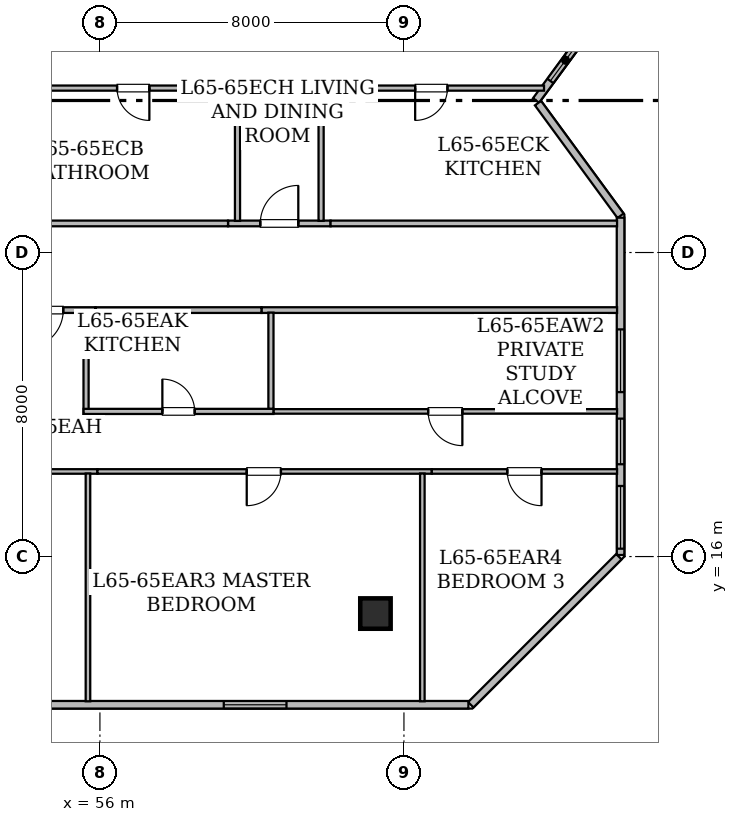
"""IFC4 building model, lengths in metres.
Left out: names, types, materials, properties, quantities, classifications, styles, units other than length and angle.
Written with IfcOpenShell. Run it as: python <this file> out.ifc"""

import sys

from ifc_helpers import new_model, si_unit, direction, frame, frame_2d, origin, origin_2d, place, context, subcontext, project, spatial, rectangle, hollow_rectangle, extrude, element, fill, save


model = new_model("IFC4")
c1 = context("Model", 3, precision=1e-05, world=origin(), true_north=direction((0.0, 1.0)))
c2 = subcontext(c1, "Body", "Model", "MODEL_VIEW")
j1 = project(units=[si_unit("LENGTHUNIT", "METRE"), si_unit("PLANEANGLEUNIT", "RADIAN")], contexts=[c1])
p1 = place(None, origin())
s1 = spatial("IfcSite", under=j1, at=p1, CompositionType="ELEMENT")
p2 = place(p1, origin())
s2 = spatial("IfcBuilding", under=s1, at=p2, CompositionType="ELEMENT")
p3 = place(p2, frame((0.0, 0.0, 253.7)))
s3 = spatial("IfcBuildingStorey", under=s2, at=p3, CompositionType="ELEMENT", Elevation=253.7)
for number, where, z_axis, x_axis in (
    (1, (63.25, 14.5, 0.0), (0.0, 0.0, 1.0), (1.0, 0.0, 0.0)),
    (2, (67.2, 21.425, 0.0), (0.0, 0.0, 1.0), (1.0, 0.0, 0.0)),
):
    element("IfcColumn", number, at=place(p3, frame(where, z_axis=z_axis, x_axis=x_axis)), inside=s3, PredefinedType="COLUMN", context=c2, shape_type="SweptSolid", body=[
        extrude(hollow_rectangle(XDim=0.8, YDim=0.8, WallThickness=0.04, at=origin_2d()), origin(), (0.0, 0.0, 1.0), 3.65),
    ])
p4 = place(p3, frame((69.67, 30.992, 0.0), z_axis=(0.0, 0.0, 1.0), x_axis=(-0.591320870733, -0.806436375566, 0.0)))
e3 = element("IfcWall", 3, at=p4, inside=s3, PredefinedType="STANDARD", context=c2, shape_type="SweptSolid", body=[
    extrude(rectangle(XDim=3.71, YDim=0.2, at=frame_2d((1.855, 0.0))), origin(), (0.0, 0.0, 1.0), 3.43),
])
p5 = place(p4, frame((1.723, 0.0, 0.85)))
e4 = element("IfcOpeningElement", 4, at=p5, cuts=e3, PredefinedType="OPENING", context=c2, shape_type="SweptSolid", body=[
    extrude(rectangle(XDim=1.35, YDim=1.5, at=frame_2d((0.675, 0.75))), frame((0.0, 0.11, 0.0), z_axis=(0.0, -1.0, 0.0), x_axis=(1.0, 0.0, 0.0)), (0.0, 0.0, 1.0), 0.22),
])
p6 = place(p3, frame((67.527, 27.931, 0.0), z_axis=(0.0, 0.0, 1.0), x_axis=(0.591248456881, -0.80648946815, 0.0)))
e5 = element("IfcWall", 5, at=p6, inside=s3, PredefinedType="STANDARD", context=c2, shape_type="SweptSolid", body=[
    extrude(rectangle(XDim=3.675, YDim=0.2, at=frame_2d((1.837, 0.0))), origin(), (0.0, 0.0, 1.0), 3.43),
])
p7 = place(p3, frame((69.7, 24.916, 0.0), z_axis=(0.0, 0.0, 1.0), x_axis=(0.0, -1.0, 0.0)))
e6 = element("IfcWall", 6, at=p7, inside=s3, PredefinedType="STANDARD", context=c2, shape_type="SweptSolid", body=[
    extrude(rectangle(XDim=8.875, YDim=0.2, at=frame_2d((4.438, 0.0))), origin(), (0.0, 0.0, 1.0), 3.43),
])
p8 = place(p7, frame((2.939, 0.0, 0.85)))
e7 = element("IfcOpeningElement", 7, at=p8, cuts=e6, PredefinedType="OPENING", context=c2, shape_type="SweptSolid", body=[
    extrude(rectangle(XDim=1.65, YDim=1.55, at=frame_2d((0.825, 0.775))), frame((0.0, 0.11, 0.0), z_axis=(0.0, -1.0, 0.0), x_axis=(1.0, 0.0, 0.0)), (0.0, 0.0, 1.0), 0.22),
])
p9 = place(p7, frame((5.287, 0.0, 0.8)))
e8 = element("IfcOpeningElement", 8, at=p9, cuts=e6, PredefinedType="OPENING", context=c2, shape_type="SweptSolid", body=[
    extrude(rectangle(XDim=1.2, YDim=1.5, at=frame_2d((0.6, 0.75))), frame((0.0, 0.11, 0.0), z_axis=(0.0, -1.0, 0.0), x_axis=(1.0, 0.0, 0.0)), (0.0, 0.0, 1.0), 0.22),
])
p10 = place(p7, frame((7.059, 0.0, 0.85)))
e9 = element("IfcOpeningElement", 9, at=p10, cuts=e6, PredefinedType="OPENING", context=c2, shape_type="SweptSolid", body=[
    extrude(rectangle(XDim=1.65, YDim=1.55, at=frame_2d((0.825, 0.775))), frame((0.0, 0.11, 0.0), z_axis=(0.0, -1.0, 0.0), x_axis=(1.0, 0.0, 0.0)), (0.0, 0.0, 1.0), 0.22),
])
p11 = place(p3, frame((69.655, 15.996, 0.0), z_axis=(0.0, 0.0, 1.0), x_axis=(-0.707106781187, -0.707106781187, 0.0)))
e10 = element("IfcWall", 10, at=p11, inside=s3, PredefinedType="STANDARD", context=c2, shape_type="SweptSolid", body=[
    extrude(rectangle(XDim=5.51, YDim=0.2, at=frame_2d((2.755, 0.0))), origin(), (0.0, 0.0, 1.0), 3.43),
])
p12 = place(p3, frame((65.696, 12.1, 0.0), z_axis=(0.0, 0.0, 1.0), x_axis=(-1.0, 0.0, 0.0)))
e11 = element("IfcWall", 11, at=p12, inside=s3, PredefinedType="STANDARD", context=c2, shape_type="SweptSolid", body=[
    extrude(rectangle(XDim=41.393, YDim=0.2, at=frame_2d((20.697, 0.0))), origin(), (0.0, 0.0, 1.0), 3.43),
])
p13 = place(p12, frame((30.646, 0.0, 0.85)))
e12 = element("IfcOpeningElement", 12, at=p13, cuts=e11, PredefinedType="OPENING", context=c2, shape_type="SweptSolid", body=[
    extrude(rectangle(XDim=1.65, YDim=1.55, at=frame_2d((0.825, 0.775))), frame((0.0, 0.11, 0.0), z_axis=(0.0, -1.0, 0.0), x_axis=(1.0, 0.0, 0.0)), (0.0, 0.0, 1.0), 0.22),
])
p14 = place(p12, frame((25.339, 0.0, 0.85)))
e13 = element("IfcOpeningElement", 13, at=p14, cuts=e11, PredefinedType="OPENING", context=c2, shape_type="SweptSolid", body=[
    extrude(rectangle(XDim=1.65, YDim=1.55, at=frame_2d((0.825, 0.775))), frame((0.0, 0.11, 0.0), z_axis=(0.0, -1.0, 0.0), x_axis=(1.0, 0.0, 0.0)), (0.0, 0.0, 1.0), 0.22),
])
p15 = place(p12, frame((20.022, 0.0, 0.85)))
e14 = element("IfcOpeningElement", 14, at=p15, cuts=e11, PredefinedType="OPENING", context=c2, shape_type="SweptSolid", body=[
    extrude(rectangle(XDim=1.65, YDim=1.55, at=frame_2d((0.825, 0.775))), frame((0.0, 0.11, 0.0), z_axis=(0.0, -1.0, 0.0), x_axis=(1.0, 0.0, 0.0)), (0.0, 0.0, 1.0), 0.22),
])
p16 = place(p12, frame((12.987, 0.0, 0.85)))
e15 = element("IfcOpeningElement", 15, at=p16, cuts=e11, PredefinedType="OPENING", context=c2, shape_type="SweptSolid", body=[
    extrude(rectangle(XDim=1.65, YDim=1.55, at=frame_2d((0.825, 0.775))), frame((0.0, 0.11, 0.0), z_axis=(0.0, -1.0, 0.0), x_axis=(1.0, 0.0, 0.0)), (0.0, 0.0, 1.0), 0.22),
])
p17 = place(p12, frame((4.787, 0.0, 0.85)))
e16 = element("IfcOpeningElement", 16, at=p17, cuts=e11, PredefinedType="OPENING", context=c2, shape_type="SweptSolid", body=[
    extrude(rectangle(XDim=1.65, YDim=1.55, at=frame_2d((0.825, 0.775))), frame((0.0, 0.11, 0.0), z_axis=(0.0, -1.0, 0.0), x_axis=(1.0, 0.0, 0.0)), (0.0, 0.0, 1.0), 0.22),
])
p18 = place(p3, frame((69.608, 22.485, 0.0), z_axis=(0.0, 0.0, 1.0), x_axis=(-1.0, 0.0, 0.0)))
e17 = element("IfcWall", 17, at=p18, inside=s3, PredefinedType="STANDARD", context=c2, shape_type="SweptSolid", body=[
    extrude(rectangle(XDim=9.357, YDim=0.15, at=frame_2d((4.678, 0.0))), origin(), (0.0, 0.0, 1.0), 2.887),
])
p19 = place(p3, frame((55.884, 22.485, 0.0), z_axis=(0.0, 0.0, 1.0), x_axis=(-1.0, 0.0, 0.0)))
e18 = element("IfcWall", 18, at=p19, inside=s3, PredefinedType="STANDARD", context=c2, shape_type="SweptSolid", body=[
    extrude(rectangle(XDim=2.698, YDim=0.15, at=frame_2d((1.349, 0.0))), origin(), (0.0, 0.0, 1.0), 2.725),
])
p20 = place(p19, frame((0.849, 0.0, 0.0)))
e19 = element("IfcOpeningElement", 19, at=p20, cuts=e18, PredefinedType="OPENING", context=c2, shape_type="SweptSolid", body=[
    extrude(rectangle(XDim=1.0, YDim=2.15, at=frame_2d((0.5, 1.075))), frame((0.0, 0.085, 0.0), z_axis=(0.0, -1.0, 0.0), x_axis=(1.0, 0.0, 0.0)), (0.0, 0.0, 1.0), 0.17),
])
p21 = place(p3, frame((60.251, 22.485, 0.0), z_axis=(0.0, 0.0, 1.0), x_axis=(-1.0, 0.0, 0.0)))
e20 = element("IfcWall", 20, at=p21, inside=s3, PredefinedType="STANDARD", context=c2, shape_type="SweptSolid", body=[
    extrude(rectangle(XDim=4.367, YDim=0.15, at=frame_2d((2.184, 0.0))), origin(), (0.0, 0.0, 1.0), 3.43),
])
p22 = place(p3, frame((59.371, 24.765, 0.0), z_axis=(0.0, 0.0, 1.0), x_axis=(1.0, 0.0, 0.0)))
e21 = element("IfcWall", 21, at=p22, inside=s3, PredefinedType="STANDARD", context=c2, shape_type="SweptSolid", body=[
    extrude(rectangle(XDim=2.698, YDim=0.15, at=frame_2d((1.349, 0.0))), origin(), (0.0, 0.0, 1.0), 3.43),
])
p23 = place(p22, frame((0.849, 0.0, 0.0)))
e22 = element("IfcOpeningElement", 22, at=p23, cuts=e21, PredefinedType="OPENING", context=c2, shape_type="SweptSolid", body=[
    extrude(rectangle(XDim=1.0, YDim=2.15, at=frame_2d((0.5, 1.075))), frame((0.0, 0.085, 0.0), z_axis=(0.0, -1.0, 0.0), x_axis=(1.0, 0.0, 0.0)), (0.0, 0.0, 1.0), 0.17),
])
p24 = place(p3, frame((54.234, 24.765, 0.0), z_axis=(0.0, 0.0, 1.0), x_axis=(1.0, 0.0, 0.0)))
e23 = element("IfcWall", 23, at=p24, inside=s3, PredefinedType="STANDARD", context=c2, shape_type="SweptSolid", body=[
    extrude(rectangle(XDim=5.137, YDim=0.15, at=frame_2d((2.569, 0.0))), origin(), (0.0, 0.0, 1.0), 3.43),
])
p25 = place(p3, frame((62.069, 24.765, 0.0), z_axis=(0.0, 0.0, 1.0), x_axis=(1.0, 0.0, 0.0)))
e24 = element("IfcWall", 24, at=p25, inside=s3, PredefinedType="STANDARD", context=c2, shape_type="SweptSolid", body=[
    extrude(rectangle(XDim=7.539, YDim=0.15, at=frame_2d((3.77, 0.0))), origin(), (0.0, 0.0, 1.0), 2.887),
])
p26 = place(p3, frame((69.608, 19.819, 0.0), z_axis=(0.0, 0.0, 1.0), x_axis=(-1.0, 0.0, 0.0)))
e25 = element("IfcWall", 25, at=p26, inside=s3, PredefinedType="PARTITIONING", context=c2, shape_type="SweptSolid", body=[
    extrude(rectangle(XDim=9.043, YDim=0.12, at=frame_2d((4.521, 0.0))), origin(), (0.0, 0.0, 1.0), 2.725),
])
p27 = place(p26, frame((4.071, 0.0, 0.0)))
e26 = element("IfcOpeningElement", 26, at=p27, cuts=e25, PredefinedType="OPENING", context=c2, shape_type="SweptSolid", body=[
    extrude(rectangle(XDim=0.9, YDim=2.1, at=frame_2d((0.45, 1.05))), frame((0.0, 0.07, 0.0), z_axis=(0.0, -1.0, 0.0), x_axis=(1.0, 0.0, 0.0)), (0.0, 0.0, 1.0), 0.14),
])
p28 = place(p3, frame((60.5, 19.884, 0.0), z_axis=(0.0, 0.0, 1.0), x_axis=(0.0, 1.0, 0.0)))
e27 = element("IfcWall", 27, at=p28, inside=s3, PredefinedType="PARTITIONING", context=c2, shape_type="SweptSolid", body=[
    extrude(rectangle(XDim=2.534, YDim=0.135, at=frame_2d((1.267, 0.0))), origin(), (0.0, 0.0, 1.0), 3.43),
])
p29 = place(p3, frame((55.635, 22.418, 0.0), z_axis=(0.0, 0.0, 1.0), x_axis=(0.0, -1.0, 0.0)))
e28 = element("IfcWall", 28, at=p29, inside=s3, PredefinedType="PARTITIONING", context=c2, shape_type="SweptSolid", body=[
    extrude(rectangle(XDim=2.664, YDim=0.135, at=frame_2d((1.332, 0.0))), origin(), (0.0, 0.0, 1.0), 3.43),
])
p30 = place(p3, frame((55.57, 19.819, 0.0), z_axis=(0.0, 0.0, 1.0), x_axis=(1.0, 0.0, 0.0)))
e29 = element("IfcWall", 29, at=p30, inside=s3, PredefinedType="PARTITIONING", context=c2, shape_type="SweptSolid", body=[
    extrude(rectangle(XDim=4.995, YDim=0.135, at=frame_2d((2.498, 0.0))), origin(), (0.0, 0.0, 1.0), 2.725),
])
p31 = place(p30, frame((2.073, 0.0, 0.0)))
e30 = element("IfcOpeningElement", 30, at=p31, cuts=e29, PredefinedType="OPENING", context=c2, shape_type="SweptSolid", body=[
    extrude(rectangle(XDim=0.85, YDim=2.1, at=frame_2d((0.425, 1.05))), frame((0.0, 0.077, 0.0), z_axis=(0.0, -1.0, 0.0), x_axis=(1.0, 0.0, 0.0)), (0.0, 0.0, 1.0), 0.155),
])
p32 = place(p3, frame((55.934, 18.239, 0.0), z_axis=(0.0, 0.0, 1.0), x_axis=(-1.0, 0.0, 0.0)))
e31 = element("IfcWall", 31, at=p32, inside=s3, PredefinedType="PARTITIONING", context=c2, shape_type="SweptSolid", body=[
    extrude(rectangle(XDim=7.601, YDim=0.12, at=frame_2d((3.801, 0.0))), origin(), (0.0, 0.0, 1.0), 2.725),
])
p33 = place(p32, frame((3.371, 0.0, 0.0)))
e32 = element("IfcOpeningElement", 32, at=p33, cuts=e31, PredefinedType="OPENING", context=c2, shape_type="SweptSolid", body=[
    extrude(rectangle(XDim=0.9, YDim=2.1, at=frame_2d((0.45, 1.05))), frame((0.0, 0.07, 0.0), z_axis=(0.0, -1.0, 0.0), x_axis=(1.0, 0.0, 0.0)), (0.0, 0.0, 1.0), 0.14),
])
p34 = place(p3, frame((64.733, 18.239, 0.0), z_axis=(0.0, 0.0, 1.0), x_axis=(-1.0, 0.0, 0.0)))
e33 = element("IfcWall", 33, at=p34, inside=s3, PredefinedType="PARTITIONING", context=c2, shape_type="SweptSolid", body=[
    extrude(rectangle(XDim=8.799, YDim=0.12, at=frame_2d((4.399, 0.0))), origin(), (0.0, 0.0, 1.0), 2.725),
])
p35 = place(p34, frame((3.97, 0.0, 0.0)))
e34 = element("IfcOpeningElement", 34, at=p35, cuts=e33, PredefinedType="OPENING", context=c2, shape_type="SweptSolid", body=[
    extrude(rectangle(XDim=0.9, YDim=2.1, at=frame_2d((0.45, 1.05))), frame((0.0, 0.07, 0.0), z_axis=(0.0, -1.0, 0.0), x_axis=(1.0, 0.0, 0.0)), (0.0, 0.0, 1.0), 0.14),
])
p36 = place(p3, frame((69.608, 18.239, 0.0), z_axis=(0.0, 0.0, 1.0), x_axis=(-1.0, 0.0, 0.0)))
e35 = element("IfcWall", 35, at=p36, inside=s3, PredefinedType="PARTITIONING", context=c2, shape_type="SweptSolid", body=[
    extrude(rectangle(XDim=4.875, YDim=0.12, at=frame_2d((2.438, 0.0))), origin(), (0.0, 0.0, 1.0), 2.887),
])
p37 = place(p36, frame((1.988, 0.0, 0.0)))
e36 = element("IfcOpeningElement", 36, at=p37, cuts=e35, PredefinedType="OPENING", context=c2, shape_type="SweptSolid", body=[
    extrude(rectangle(XDim=0.9, YDim=2.1, at=frame_2d((0.45, 1.05))), frame((0.0, 0.07, 0.0), z_axis=(0.0, -1.0, 0.0), x_axis=(1.0, 0.0, 0.0)), (0.0, 0.0, 1.0), 0.14),
])
p38 = place(p3, frame((55.685, 18.185, 0.0), z_axis=(0.0, 0.0, 1.0), x_axis=(0.0, -1.0, 0.0)))
e37 = element("IfcWall", 37, at=p38, inside=s3, PredefinedType="PARTITIONING", context=c2, shape_type="SweptSolid", body=[
    extrude(rectangle(XDim=5.993, YDim=0.12, at=frame_2d((2.997, 0.0))), origin(), (0.0, 0.0, 1.0), 2.725),
])
p39 = place(p3, frame((64.484, 18.185, 0.0), z_axis=(0.0, 0.0, 1.0), x_axis=(0.0, -1.0, 0.0)))
e38 = element("IfcWall", 38, at=p39, inside=s3, PredefinedType="PARTITIONING", context=c2, shape_type="SweptSolid", body=[
    extrude(rectangle(XDim=5.993, YDim=0.12, at=frame_2d((2.997, 0.0))), origin(), (0.0, 0.0, 1.0), 2.887),
])
p40 = place(p3, frame((59.62, 24.832, 0.0), z_axis=(0.0, 0.0, 1.0), x_axis=(0.0, 1.0, 0.0)))
e39 = element("IfcWall", 39, at=p40, inside=s3, PredefinedType="PARTITIONING", context=c2, shape_type="SweptSolid", body=[
    extrude(rectangle(XDim=3.559, YDim=0.135, at=frame_2d((1.78, 0.0))), origin(), (0.0, 0.0, 1.0), 3.43),
])
p41 = place(p3, frame((59.685, 28.326, 0.0), z_axis=(0.0, 0.0, 1.0), x_axis=(-1.0, 0.0, 0.0)))
e40 = element("IfcWall", 40, at=p41, inside=s3, PredefinedType="PARTITIONING", context=c2, shape_type="SweptSolid", body=[
    extrude(rectangle(XDim=5.618, YDim=0.135, at=frame_2d((2.809, 0.0))), origin(), (0.0, 0.0, 1.0), 3.43),
])
p42 = place(p41, frame((2.384, 0.0, 0.0)))
e41 = element("IfcOpeningElement", 41, at=p42, cuts=e40, PredefinedType="OPENING", context=c2, shape_type="SweptSolid", body=[
    extrude(rectangle(XDim=0.85, YDim=2.1, at=frame_2d((0.425, 1.05))), frame((0.0, 0.077, 0.0), z_axis=(0.0, -1.0, 0.0), x_axis=(1.0, 0.0, 0.0)), (0.0, 0.0, 1.0), 0.155),
])
p43 = place(p3, frame((67.686, 28.326, 0.0), z_axis=(0.0, 0.0, 1.0), x_axis=(-1.0, 0.0, 0.0)))
e42 = element("IfcWall", 42, at=p43, inside=s3, PredefinedType="PARTITIONING", context=c2, shape_type="SweptSolid", body=[
    extrude(rectangle(XDim=5.931, YDim=0.135, at=frame_2d((2.966, 0.0))), origin(), (0.0, 0.0, 1.0), 2.887),
])
p44 = place(p43, frame((2.541, 0.0, 0.0)))
e43 = element("IfcOpeningElement", 43, at=p44, cuts=e42, PredefinedType="OPENING", context=c2, shape_type="SweptSolid", body=[
    extrude(rectangle(XDim=0.85, YDim=2.1, at=frame_2d((0.425, 1.05))), frame((0.0, 0.077, 0.0), z_axis=(0.0, -1.0, 0.0), x_axis=(1.0, 0.0, 0.0)), (0.0, 0.0, 1.0), 0.155),
])
p45 = place(p3, frame((61.82, 28.391, 0.0), z_axis=(0.0, 0.0, 1.0), x_axis=(0.0, -1.0, 0.0)))
e44 = element("IfcWall", 44, at=p45, inside=s3, PredefinedType="PARTITIONING", context=c2, shape_type="SweptSolid", body=[
    extrude(rectangle(XDim=3.559, YDim=0.135, at=frame_2d((1.78, 0.0))), origin(), (0.0, 0.0, 1.0), 3.43),
])
p46 = place(p8, origin())
e45 = element("IfcWindow", 45, at=p46, inside=s3, PartitioningType="SINGLE_PANEL", PredefinedType="WINDOW", context=c2, shape_type="SweptSolid", body=[
    extrude(rectangle(XDim=1.65, YDim=1.55, at=frame_2d((0.825, 0.775))), frame((0.0, 0.03, 0.0), z_axis=(0.0, -1.0, 0.0), x_axis=(1.0, 0.0, 0.0)), (0.0, 0.0, 1.0), 0.06),
])
fill(e7, e45)
p47 = place(p9, origin())
e46 = element("IfcWindow", 46, at=p47, inside=s3, PartitioningType="SINGLE_PANEL", PredefinedType="WINDOW", context=c2, shape_type="SweptSolid", body=[
    extrude(rectangle(XDim=1.2, YDim=1.5, at=frame_2d((0.6, 0.75))), frame((0.0, 0.03, 0.0), z_axis=(0.0, -1.0, 0.0), x_axis=(1.0, 0.0, 0.0)), (0.0, 0.0, 1.0), 0.06),
])
fill(e8, e46)
p48 = place(p17, origin())
e47 = element("IfcWindow", 47, at=p48, inside=s3, PartitioningType="SINGLE_PANEL", PredefinedType="WINDOW", context=c2, shape_type="SweptSolid", body=[
    extrude(rectangle(XDim=1.65, YDim=1.55, at=frame_2d((0.825, 0.775))), frame((0.0, 0.03, 0.0), z_axis=(0.0, -1.0, 0.0), x_axis=(1.0, 0.0, 0.0)), (0.0, 0.0, 1.0), 0.06),
])
fill(e16, e47)
p49 = place(p10, origin())
e48 = element("IfcWindow", 48, at=p49, inside=s3, PartitioningType="SINGLE_PANEL", PredefinedType="WINDOW", context=c2, shape_type="SweptSolid", body=[
    extrude(rectangle(XDim=1.65, YDim=1.55, at=frame_2d((0.825, 0.775))), frame((0.0, 0.03, 0.0), z_axis=(0.0, -1.0, 0.0), x_axis=(1.0, 0.0, 0.0)), (0.0, 0.0, 1.0), 0.06),
])
fill(e9, e48)
p50 = place(p5, origin())
e49 = element("IfcWindow", 49, at=p50, inside=s3, PartitioningType="SINGLE_PANEL", PredefinedType="WINDOW", context=c2, shape_type="SweptSolid", body=[
    extrude(rectangle(XDim=1.35, YDim=1.5, at=frame_2d((0.675, 0.75))), frame((0.0, 0.03, 0.0), z_axis=(0.0, -1.0, 0.0), x_axis=(1.0, 0.0, 0.0)), (0.0, 0.0, 1.0), 0.06),
])
fill(e4, e49)
p51 = place(p20, origin())
e50 = element("IfcDoor", 50, at=p51, inside=s3, OperationType="SINGLE_SWING_RIGHT", PredefinedType="DOOR", context=c2, shape_type="SweptSolid", body=[
    extrude(rectangle(XDim=1.0, YDim=2.15, at=frame_2d((0.5, 1.075))), frame((0.0, 0.025, 0.0), z_axis=(0.0, -1.0, 0.0), x_axis=(1.0, 0.0, 0.0)), (0.0, 0.0, 1.0), 0.05),
])
fill(e19, e50)
p52 = place(p23, origin())
e51 = element("IfcDoor", 51, at=p52, inside=s3, OperationType="SINGLE_SWING_RIGHT", PredefinedType="DOOR", context=c2, shape_type="SweptSolid", body=[
    extrude(rectangle(XDim=1.0, YDim=2.15, at=frame_2d((0.5, 1.075))), frame((0.0, 0.025, 0.0), z_axis=(0.0, -1.0, 0.0), x_axis=(1.0, 0.0, 0.0)), (0.0, 0.0, 1.0), 0.05),
])
fill(e22, e51)
p53 = place(p27, origin())
e52 = element("IfcDoor", 52, at=p53, inside=s3, OperationType="SINGLE_SWING_LEFT", PredefinedType="DOOR", context=c2, shape_type="SweptSolid", body=[
    extrude(rectangle(XDim=0.9, YDim=2.1, at=frame_2d((0.45, 1.05))), frame((0.0, 0.025, 0.0), z_axis=(0.0, -1.0, 0.0), x_axis=(1.0, 0.0, 0.0)), (0.0, 0.0, 1.0), 0.05),
])
fill(e26, e52)
p54 = place(p31, origin())
e53 = element("IfcDoor", 53, at=p54, inside=s3, OperationType="SINGLE_SWING_LEFT", PredefinedType="DOOR", context=c2, shape_type="SweptSolid", body=[
    extrude(rectangle(XDim=0.85, YDim=2.1, at=frame_2d((0.425, 1.05))), frame((0.0, 0.025, 0.0), z_axis=(0.0, -1.0, 0.0), x_axis=(1.0, 0.0, 0.0)), (0.0, 0.0, 1.0), 0.05),
])
fill(e30, e53)
p55 = place(p35, origin())
e54 = element("IfcDoor", 54, at=p55, inside=s3, OperationType="SINGLE_SWING_RIGHT", PredefinedType="DOOR", context=c2, shape_type="SweptSolid", body=[
    extrude(rectangle(XDim=0.9, YDim=2.1, at=frame_2d((0.45, 1.05))), frame((0.0, 0.025, 0.0), z_axis=(0.0, -1.0, 0.0), x_axis=(1.0, 0.0, 0.0)), (0.0, 0.0, 1.0), 0.05),
])
fill(e34, e54)
p56 = place(p37, origin())
e55 = element("IfcDoor", 55, at=p56, inside=s3, OperationType="SINGLE_SWING_LEFT", PredefinedType="DOOR", context=c2, shape_type="SweptSolid", body=[
    extrude(rectangle(XDim=0.9, YDim=2.1, at=frame_2d((0.45, 1.05))), frame((0.0, 0.025, 0.0), z_axis=(0.0, -1.0, 0.0), x_axis=(1.0, 0.0, 0.0)), (0.0, 0.0, 1.0), 0.05),
])
fill(e36, e55)
p57 = place(p42, origin())
e56 = element("IfcDoor", 56, at=p57, inside=s3, OperationType="SINGLE_SWING_LEFT", PredefinedType="DOOR", context=c2, shape_type="SweptSolid", body=[
    extrude(rectangle(XDim=0.85, YDim=2.1, at=frame_2d((0.425, 1.05))), frame((0.0, 0.025, 0.0), z_axis=(0.0, -1.0, 0.0), x_axis=(1.0, 0.0, 0.0)), (0.0, 0.0, 1.0), 0.05),
])
fill(e41, e56)
p58 = place(p44, origin())
e57 = element("IfcDoor", 57, at=p58, inside=s3, OperationType="SINGLE_SWING_RIGHT", PredefinedType="DOOR", context=c2, shape_type="SweptSolid", body=[
    extrude(rectangle(XDim=0.85, YDim=2.1, at=frame_2d((0.425, 1.05))), frame((0.0, 0.025, 0.0), z_axis=(0.0, -1.0, 0.0), x_axis=(1.0, 0.0, 0.0)), (0.0, 0.0, 1.0), 0.05),
])
fill(e43, e57)
save(model, sys.argv[1])
